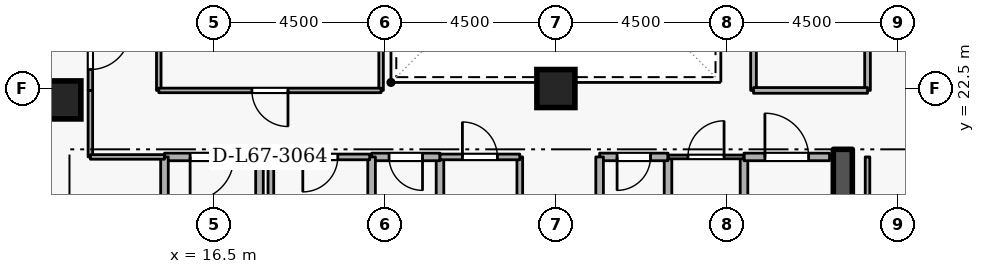
"""IFC4 building model, lengths in metres.
Left out: names, types, materials, properties, quantities, classifications, styles, units other than length and angle.
Written with IfcOpenShell. Run it as: python <this file> out.ifc"""

import sys

from ifc_helpers import new_model, si_unit, direction, frame, frame_2d, origin, origin_2d, place, context, subcontext, project, spatial, rectangle, extrude, element, fill, save


model = new_model("IFC4")
c1 = context("Model", 3, precision=1e-05, world=origin(), true_north=direction((0.0, 1.0)))
c2 = subcontext(c1, "Body", "Model", "MODEL_VIEW")
j1 = project(units=[si_unit("LENGTHUNIT", "METRE"), si_unit("PLANEANGLEUNIT", "RADIAN")], contexts=[c1])
p1 = place(None, origin())
s1 = spatial("IfcSite", under=j1, at=p1, CompositionType="ELEMENT")
p2 = place(p1, origin())
s2 = spatial("IfcBuilding", under=s1, at=p2, CompositionType="ELEMENT")
p3 = place(p2, frame((0.0, 0.0, 251.1)))
s3 = spatial("IfcBuildingStorey", under=s2, at=p3, CompositionType="ELEMENT", Elevation=251.1)
p4 = place(p3, frame((33.05, 15.1, 0.0), z_axis=(0.0, 0.0, 1.0), x_axis=(0.0, 1.0, 0.0)))
e1 = element("IfcWall", 1, at=p4, inside=s3, PredefinedType="SHEAR", context=c2, shape_type="SweptSolid", body=[
    extrude(rectangle(XDim=5.8, YDim=0.5, at=frame_2d((2.9, 0.0))), origin(), (0.0, 0.0, 1.0), 3.6),
])
for number, where, z_axis, x_axis in (
    (2, (12.5, 22.2, 0.0), (0.0, 0.0, 1.0), (1.0, 0.0, 0.0)),
    (3, (25.5, 22.5, 0.0), (0.0, 0.0, 1.0), (1.0, 0.0, 0.0)),
):
    element("IfcColumn", number, at=place(p3, frame(where, z_axis=z_axis, x_axis=x_axis)), inside=s3, PredefinedType="COLUMN", context=c2, shape_type="SweptSolid", body=[
        extrude(rectangle(XDim=1.0, YDim=1.0, at=origin_2d()), origin(), (0.0, 0.0, 1.0), 3.6),
    ])
p5 = place(p3, frame((17.7, 18.4, 0.0), z_axis=(0.0, 0.0, 1.0), x_axis=(0.0, 1.0, 0.0)))
e4 = element("IfcWall", 4, at=p5, inside=s3, PredefinedType="STANDARD", context=c2, shape_type="SweptSolid", body=[
    extrude(rectangle(XDim=2.3, YDim=0.2, at=frame_2d((1.15, 0.0))), origin(), (0.0, 0.0, 1.0), 2.525),
])
p6 = place(p3, frame((17.7, 20.7, 0.0), z_axis=(0.0, 0.0, 1.0), x_axis=(-1.0, 0.0, 0.0)))
e5 = element("IfcWall", 5, at=p6, inside=s3, PredefinedType="STANDARD", context=c2, shape_type="SweptSolid", body=[
    extrude(rectangle(XDim=2.5, YDim=0.2, at=frame_2d((1.25, 0.0))), origin(), (0.0, 0.0, 1.0), 3.32),
])
p7 = place(p6, frame((0.675, 0.0, 0.0)))
e6 = element("IfcOpeningElement", 6, at=p7, cuts=e5, PredefinedType="OPENING", context=c2, shape_type="SweptSolid", body=[
    extrude(rectangle(XDim=1.15, YDim=2.1, at=frame_2d((0.575, 1.05))), frame((0.0, 0.11, 0.0), z_axis=(0.0, -1.0, 0.0), x_axis=(1.0, 0.0, 0.0)), (0.0, 0.0, 1.0), 0.22),
])
p8 = place(p3, frame((15.2, 20.7, 0.0), z_axis=(0.0, 0.0, 1.0), x_axis=(0.0, -1.0, 0.0)))
e7 = element("IfcWall", 7, at=p8, inside=s3, PredefinedType="STANDARD", context=c2, shape_type="SweptSolid", body=[
    extrude(rectangle(XDim=5.7, YDim=0.2, at=frame_2d((2.85, 0.0))), origin(), (0.0, 0.0, 1.0), 3.32),
])
p9 = place(p3, frame((28.45, 18.65, 0.0), z_axis=(0.0, 0.0, 1.0), x_axis=(0.0, 1.0, 0.0)))
e8 = element("IfcWall", 8, at=p9, inside=s3, PredefinedType="STANDARD", context=c2, shape_type="SweptSolid", body=[
    extrude(rectangle(XDim=2.05, YDim=0.2, at=frame_2d((1.025, 0.0))), origin(), (0.0, 0.0, 1.0), 3.32),
])
p10 = place(p3, frame((28.45, 20.7, 0.0), z_axis=(0.0, 0.0, 1.0), x_axis=(-1.0, 0.0, 0.0)))
e9 = element("IfcWall", 9, at=p10, inside=s3, PredefinedType="STANDARD", context=c2, shape_type="SweptSolid", body=[
    extrude(rectangle(XDim=1.8, YDim=0.2, at=frame_2d((0.9, 0.0))), origin(), (0.0, 0.0, 1.0), 3.32),
])
p11 = place(p10, frame((0.46, 0.0, 0.0)))
e10 = element("IfcOpeningElement", 10, at=p11, cuts=e9, PredefinedType="OPENING", context=c2, shape_type="SweptSolid", body=[
    extrude(rectangle(XDim=0.88, YDim=2.04, at=frame_2d((0.44, 1.02))), frame((0.0, 0.11, 0.0), z_axis=(0.0, -1.0, 0.0), x_axis=(1.0, 0.0, 0.0)), (0.0, 0.0, 1.0), 0.22),
])
for number, where, z_axis, x_axis in (
    (11, (26.65, 20.7, 0.0), (0.0, 0.0, 1.0), (0.0, -1.0, 0.0)),
    (12, (22.45, 18.65, 0.0), (0.0, 0.0, 1.0), (0.0, 1.0, 0.0)),
):
    element("IfcWall", number, at=place(p3, frame(where, z_axis=z_axis, x_axis=x_axis)), inside=s3, PredefinedType="STANDARD", context=c2, shape_type="SweptSolid", body=[
        extrude(rectangle(XDim=2.05, YDim=0.2, at=frame_2d((1.025, 0.0))), origin(), (0.0, 0.0, 1.0), 3.32),
    ])
p12 = place(p3, frame((22.45, 20.7, 0.0), z_axis=(0.0, 0.0, 1.0), x_axis=(-1.0, 0.0, 0.0)))
e13 = element("IfcWall", 13, at=p12, inside=s3, PredefinedType="STANDARD", context=c2, shape_type="SweptSolid", body=[
    extrude(rectangle(XDim=1.8, YDim=0.2, at=frame_2d((0.9, 0.0))), origin(), (0.0, 0.0, 1.0), 3.32),
])
p13 = place(p12, frame((0.46, 0.0, 0.0)))
e14 = element("IfcOpeningElement", 14, at=p13, cuts=e13, PredefinedType="OPENING", context=c2, shape_type="SweptSolid", body=[
    extrude(rectangle(XDim=0.88, YDim=2.04, at=frame_2d((0.44, 1.02))), frame((0.0, 0.11, 0.0), z_axis=(0.0, -1.0, 0.0), x_axis=(1.0, 0.0, 0.0)), (0.0, 0.0, 1.0), 0.22),
])
for number, where, z_axis, x_axis in (
    (15, (20.65, 20.7, 0.0), (0.0, 0.0, 1.0), (0.0, -1.0, 0.0)),
    (16, (30.45, 18.65, 0.0), (0.0, 0.0, 1.0), (0.0, 1.0, 0.0)),
):
    element("IfcWall", number, at=place(p3, frame(where, z_axis=z_axis, x_axis=x_axis)), inside=s3, PredefinedType="STANDARD", context=c2, shape_type="SweptSolid", body=[
        extrude(rectangle(XDim=2.05, YDim=0.2, at=frame_2d((1.025, 0.0))), origin(), (0.0, 0.0, 1.0), 3.32),
    ])
p14 = place(p3, frame((30.45, 20.7, 0.0), z_axis=(0.0, 0.0, 1.0), x_axis=(1.0, 0.0, 0.0)))
e17 = element("IfcWall", 17, at=p14, inside=s3, PredefinedType="STANDARD", context=c2, shape_type="SweptSolid", body=[
    extrude(rectangle(XDim=2.25, YDim=0.2, at=frame_2d((1.125, 0.0))), origin(), (0.0, 0.0, 1.0), 3.32),
])
p15 = place(p14, frame((0.55, 0.0, 0.0)))
e18 = element("IfcOpeningElement", 18, at=p15, cuts=e17, PredefinedType="OPENING", context=c2, shape_type="SweptSolid", body=[
    extrude(rectangle(XDim=1.15, YDim=2.1, at=frame_2d((0.575, 1.05))), frame((0.0, 0.11, 0.0), z_axis=(0.0, -1.0, 0.0), x_axis=(1.0, 0.0, 0.0)), (0.0, 0.0, 1.0), 0.22),
])
p16 = place(p3, frame((20.6, 20.7, 0.0), z_axis=(0.0, 0.0, 1.0), x_axis=(-1.0, 0.0, 0.0)))
e19 = element("IfcWall", 19, at=p16, inside=s3, PredefinedType="PARTITIONING", context=c2, shape_type="SweptSolid", body=[
    extrude(rectangle(XDim=2.6, YDim=0.15, at=frame_2d((1.3, 0.0))), origin(), (0.0, 0.0, 1.0), 3.32),
])
p17 = place(p16, frame((0.84, 0.0, 0.0)))
e20 = element("IfcOpeningElement", 20, at=p17, cuts=e19, PredefinedType="OPENING", context=c2, shape_type="SweptSolid", body=[
    extrude(rectangle(XDim=0.92, YDim=2.08, at=frame_2d((0.46, 1.04))), frame((0.0, 0.085, 0.0), z_axis=(0.0, -1.0, 0.0), x_axis=(1.0, 0.0, 0.0)), (0.0, 0.0, 1.0), 0.17),
])
p18 = place(p3, frame((18.0, 20.7, 0.0), z_axis=(0.0, 0.0, 1.0), x_axis=(0.0, -1.0, 0.0)))
e21 = element("IfcWall", 21, at=p18, inside=s3, PredefinedType="PARTITIONING", context=c2, shape_type="SweptSolid", body=[
    extrude(rectangle(XDim=2.05, YDim=0.15, at=frame_2d((1.025, 0.0))), origin(), (0.0, 0.0, 1.0), 2.525),
])
p19 = place(p3, frame((24.55, 20.7, 0.0), z_axis=(0.0, 0.0, 1.0), x_axis=(0.0, -1.0, 0.0)))
e22 = element("IfcWall", 22, at=p19, inside=s3, PredefinedType="PARTITIONING", context=c2, shape_type="SweptSolid", body=[
    extrude(rectangle(XDim=2.05, YDim=0.15, at=frame_2d((1.025, 0.0))), origin(), (0.0, 0.0, 1.0), 3.32),
])
p20 = place(p3, frame((22.45, 20.7, 0.0), z_axis=(0.0, 0.0, 1.0), x_axis=(1.0, 0.0, 0.0)))
e23 = element("IfcWall", 23, at=p20, inside=s3, PredefinedType="PARTITIONING", context=c2, shape_type="SweptSolid", body=[
    extrude(rectangle(XDim=2.1, YDim=0.15, at=frame_2d((1.05, 0.0))), origin(), (0.0, 0.0, 1.0), 3.32),
])
p21 = place(p20, frame((0.59, 0.0, 0.0)))
e24 = element("IfcOpeningElement", 24, at=p21, cuts=e23, PredefinedType="OPENING", context=c2, shape_type="SweptSolid", body=[
    extrude(rectangle(XDim=0.92, YDim=2.08, at=frame_2d((0.46, 1.04))), frame((0.0, 0.085, 0.0), z_axis=(0.0, -1.0, 0.0), x_axis=(1.0, 0.0, 0.0)), (0.0, 0.0, 1.0), 0.17),
])
p22 = place(p3, frame((28.45, 20.7, 0.0), z_axis=(0.0, 0.0, 1.0), x_axis=(1.0, 0.0, 0.0)))
e25 = element("IfcWall", 25, at=p22, inside=s3, PredefinedType="PARTITIONING", context=c2, shape_type="SweptSolid", body=[
    extrude(rectangle(XDim=2.0, YDim=0.1, at=frame_2d((1.0, 0.0))), origin(), (0.0, 0.0, 1.0), 3.32),
])
p23 = place(p22, frame((0.525, 0.0, 0.0)))
e26 = element("IfcOpeningElement", 26, at=p23, cuts=e25, PredefinedType="OPENING", context=c2, shape_type="SweptSolid", body=[
    extrude(rectangle(XDim=0.95, YDim=2.1, at=frame_2d((0.475, 1.05))), frame((0.0, 0.06, 0.0), z_axis=(0.0, -1.0, 0.0), x_axis=(1.0, 0.0, 0.0)), (0.0, 0.0, 1.0), 0.12),
])
p24 = place(p3, frame((33.7, 20.7, 0.0), z_axis=(0.0, 0.0, 1.0), x_axis=(0.0, -1.0, 0.0)))
e27 = element("IfcWall", 27, at=p24, inside=s3, PredefinedType="PARTITIONING", context=c2, shape_type="SweptSolid", body=[
    extrude(rectangle(XDim=5.9, YDim=0.12, at=frame_2d((2.95, 0.0))), origin(), (0.0, 0.0, 1.0), 3.32),
])
p25 = place(p3, frame((13.25, 22.45, 0.0), z_axis=(0.0, 0.0, 1.0), x_axis=(0.0, -1.0, 0.0)))
e28 = element("IfcWall", 28, at=p25, inside=s3, PredefinedType="PARTITIONING", context=c2, shape_type="SweptSolid", body=[
    extrude(rectangle(XDim=1.75, YDim=0.12, at=frame_2d((0.875, 0.0))), origin(), (0.0, 0.0, 1.0), 3.32),
])
p26 = place(p3, frame((13.25, 20.7, 0.0), z_axis=(0.0, 0.0, 1.0), x_axis=(1.0, 0.0, 0.0)))
e29 = element("IfcWall", 29, at=p26, inside=s3, PredefinedType="PARTITIONING", context=c2, shape_type="SweptSolid", body=[
    extrude(rectangle(XDim=1.95, YDim=0.12, at=frame_2d((0.975, 0.0))), origin(), (0.0, 0.0, 1.0), 3.32),
])
p27 = place(p3, frame((13.25, 24.6, 0.0), z_axis=(0.0, 0.0, 1.0), x_axis=(0.0, -1.0, 0.0)))
e30 = element("IfcWall", 30, at=p27, inside=s3, PredefinedType="PARTITIONING", context=c2, shape_type="SweptSolid", body=[
    extrude(rectangle(XDim=2.15, YDim=0.12, at=frame_2d((1.075, 0.0))), origin(), (0.0, 0.0, 1.0), 3.32),
])
p28 = place(p27, frame((0.55, 0.0, 0.0)))
e31 = element("IfcOpeningElement", 31, at=p28, cuts=e30, PredefinedType="OPENING", context=c2, shape_type="SweptSolid", body=[
    extrude(rectangle(XDim=1.05, YDim=2.1, at=frame_2d((0.525, 1.05))), frame((0.0, 0.07, 0.0), z_axis=(0.0, -1.0, 0.0), x_axis=(1.0, 0.0, 0.0)), (0.0, 0.0, 1.0), 0.14),
])
for number, where, z_axis, x_axis in (
    (32, (15.05, 22.45, 0.0), (0.0, 0.0, 1.0), (0.0, 1.0, 0.0)),
    (33, (20.9, 26.2, 0.0), (0.0, 0.0, 1.0), (0.0, -1.0, 0.0)),
):
    element("IfcWall", number, at=place(p3, frame(where, z_axis=z_axis, x_axis=x_axis)), inside=s3, PredefinedType="PARTITIONING", context=c2, shape_type="SweptSolid", body=[
        extrude(rectangle(XDim=3.75, YDim=0.12, at=frame_2d((1.875, 0.0))), origin(), (0.0, 0.0, 1.0), 3.32),
    ])
p29 = place(p3, frame((20.9, 22.45, 0.0), z_axis=(0.0, 0.0, 1.0), x_axis=(-1.0, 0.0, 0.0)))
e34 = element("IfcWall", 34, at=p29, inside=s3, PredefinedType="PARTITIONING", context=c2, shape_type="SweptSolid", body=[
    extrude(rectangle(XDim=5.85, YDim=0.12, at=frame_2d((2.925, 0.0))), origin(), (0.0, 0.0, 1.0), 3.32),
])
p30 = place(p29, frame((2.45, 0.0, 0.0)))
e35 = element("IfcOpeningElement", 35, at=p30, cuts=e34, PredefinedType="OPENING", context=c2, shape_type="SweptSolid", body=[
    extrude(rectangle(XDim=0.95, YDim=2.1, at=frame_2d((0.475, 1.05))), frame((0.0, 0.07, 0.0), z_axis=(0.0, -1.0, 0.0), x_axis=(1.0, 0.0, 0.0)), (0.0, 0.0, 1.0), 0.14),
])
p31 = place(p3, frame((30.7, 22.45, 0.0), z_axis=(0.0, 0.0, 1.0), x_axis=(0.0, 1.0, 0.0)))
e36 = element("IfcWall", 36, at=p31, inside=s3, PredefinedType="PARTITIONING", context=c2, shape_type="SweptSolid", body=[
    extrude(rectangle(XDim=4.0, YDim=0.15, at=frame_2d((2.0, 0.0))), origin(), (0.0, 0.0, 1.0), 3.32),
])
p32 = place(p3, frame((33.7, 26.45, 0.0), z_axis=(0.0, 0.0, 1.0), x_axis=(0.0, -1.0, 0.0)))
e37 = element("IfcWall", 37, at=p32, inside=s3, PredefinedType="PARTITIONING", context=c2, shape_type="SweptSolid", body=[
    extrude(rectangle(XDim=4.0, YDim=0.15, at=frame_2d((2.0, 0.0))), origin(), (0.0, 0.0, 1.0), 3.32),
])
p33 = place(p32, frame((1.35, 0.0, 0.0)))
e38 = element("IfcOpeningElement", 38, at=p33, cuts=e37, PredefinedType="OPENING", context=c2, shape_type="SweptSolid", body=[
    extrude(rectangle(XDim=1.3, YDim=2.12, at=frame_2d((0.65, 1.06))), frame((0.0, 0.085, 0.0), z_axis=(0.0, -1.0, 0.0), x_axis=(1.0, 0.0, 0.0)), (0.0, 0.0, 1.0), 0.17),
])
p34 = place(p3, frame((33.7, 22.45, 0.0), z_axis=(0.0, 0.0, 1.0), x_axis=(-1.0, 0.0, 0.0)))
e39 = element("IfcWall", 39, at=p34, inside=s3, PredefinedType="PARTITIONING", context=c2, shape_type="SweptSolid", body=[
    extrude(rectangle(XDim=3.0, YDim=0.15, at=frame_2d((1.5, 0.0))), origin(), (0.0, 0.0, 1.0), 3.32),
])
p35 = place(p7, origin())
e40 = element("IfcDoor", 40, at=p35, inside=s3, OperationType="SINGLE_SWING_RIGHT", PredefinedType="DOOR", context=c2, shape_type="SweptSolid", body=[
    extrude(rectangle(XDim=1.15, YDim=2.1, at=frame_2d((0.575, 1.05))), frame((0.0, 0.025, 0.0), z_axis=(0.0, -1.0, 0.0), x_axis=(1.0, 0.0, 0.0)), (0.0, 0.0, 1.0), 0.05),
])
fill(e6, e40)
p36 = place(p11, origin())
e41 = element("IfcDoor", 41, at=p36, inside=s3, OperationType="SINGLE_SWING_RIGHT", PredefinedType="DOOR", context=c2, shape_type="SweptSolid", body=[
    extrude(rectangle(XDim=0.88, YDim=2.04, at=frame_2d((0.44, 1.02))), frame((0.0, 0.025, 0.0), z_axis=(0.0, -1.0, 0.0), x_axis=(1.0, 0.0, 0.0)), (0.0, 0.0, 1.0), 0.05),
])
fill(e10, e41)
p37 = place(p13, origin())
e42 = element("IfcDoor", 42, at=p37, inside=s3, OperationType="SINGLE_SWING_LEFT", PredefinedType="DOOR", context=c2, shape_type="SweptSolid", body=[
    extrude(rectangle(XDim=0.88, YDim=2.04, at=frame_2d((0.44, 1.02))), frame((0.0, 0.025, 0.0), z_axis=(0.0, -1.0, 0.0), x_axis=(1.0, 0.0, 0.0)), (0.0, 0.0, 1.0), 0.05),
])
fill(e14, e42)
p38 = place(p17, origin())
e43 = element("IfcDoor", 43, at=p38, inside=s3, OperationType="SINGLE_SWING_RIGHT", PredefinedType="DOOR", context=c2, shape_type="SweptSolid", body=[
    extrude(rectangle(XDim=0.92, YDim=2.08, at=frame_2d((0.46, 1.04))), frame((0.0, 0.025, 0.0), z_axis=(0.0, -1.0, 0.0), x_axis=(1.0, 0.0, 0.0)), (0.0, 0.0, 1.0), 0.05),
])
fill(e20, e43)
p39 = place(p21, origin())
e44 = element("IfcDoor", 44, at=p39, inside=s3, OperationType="SINGLE_SWING_LEFT", PredefinedType="DOOR", context=c2, shape_type="SweptSolid", body=[
    extrude(rectangle(XDim=0.92, YDim=2.08, at=frame_2d((0.46, 1.04))), frame((0.0, 0.025, 0.0), z_axis=(0.0, -1.0, 0.0), x_axis=(1.0, 0.0, 0.0)), (0.0, 0.0, 1.0), 0.05),
])
fill(e24, e44)
p40 = place(p23, origin())
e45 = element("IfcDoor", 45, at=p40, inside=s3, OperationType="SINGLE_SWING_RIGHT", PredefinedType="DOOR", context=c2, shape_type="SweptSolid", body=[
    extrude(rectangle(XDim=0.95, YDim=2.1, at=frame_2d((0.475, 1.05))), frame((0.0, 0.025, 0.0), z_axis=(0.0, -1.0, 0.0), x_axis=(1.0, 0.0, 0.0)), (0.0, 0.0, 1.0), 0.05),
])
fill(e26, e45)
p41 = place(p15, origin())
e46 = element("IfcDoor", 46, at=p41, inside=s3, OperationType="SINGLE_SWING_LEFT", PredefinedType="DOOR", context=c2, shape_type="SweptSolid", body=[
    extrude(rectangle(XDim=1.15, YDim=2.1, at=frame_2d((0.575, 1.05))), frame((0.0, 0.025, 0.0), z_axis=(0.0, -1.0, 0.0), x_axis=(1.0, 0.0, 0.0)), (0.0, 0.0, 1.0), 0.05),
])
fill(e18, e46)
p42 = place(p28, origin())
e47 = element("IfcDoor", 47, at=p42, inside=s3, OperationType="SINGLE_SWING_LEFT", PredefinedType="DOOR", context=c2, shape_type="SweptSolid", body=[
    extrude(rectangle(XDim=1.05, YDim=2.1, at=frame_2d((0.525, 1.05))), frame((0.0, 0.025, 0.0), z_axis=(0.0, -1.0, 0.0), x_axis=(1.0, 0.0, 0.0)), (0.0, 0.0, 1.0), 0.05),
])
fill(e31, e47)
p43 = place(p30, origin())
e48 = element("IfcDoor", 48, at=p43, inside=s3, OperationType="SINGLE_SWING_LEFT", PredefinedType="DOOR", context=c2, shape_type="SweptSolid", body=[
    extrude(rectangle(XDim=0.95, YDim=2.1, at=frame_2d((0.475, 1.05))), frame((0.0, 0.025, 0.0), z_axis=(0.0, -1.0, 0.0), x_axis=(1.0, 0.0, 0.0)), (0.0, 0.0, 1.0), 0.05),
])
fill(e35, e48)
save(model, sys.argv[1])
